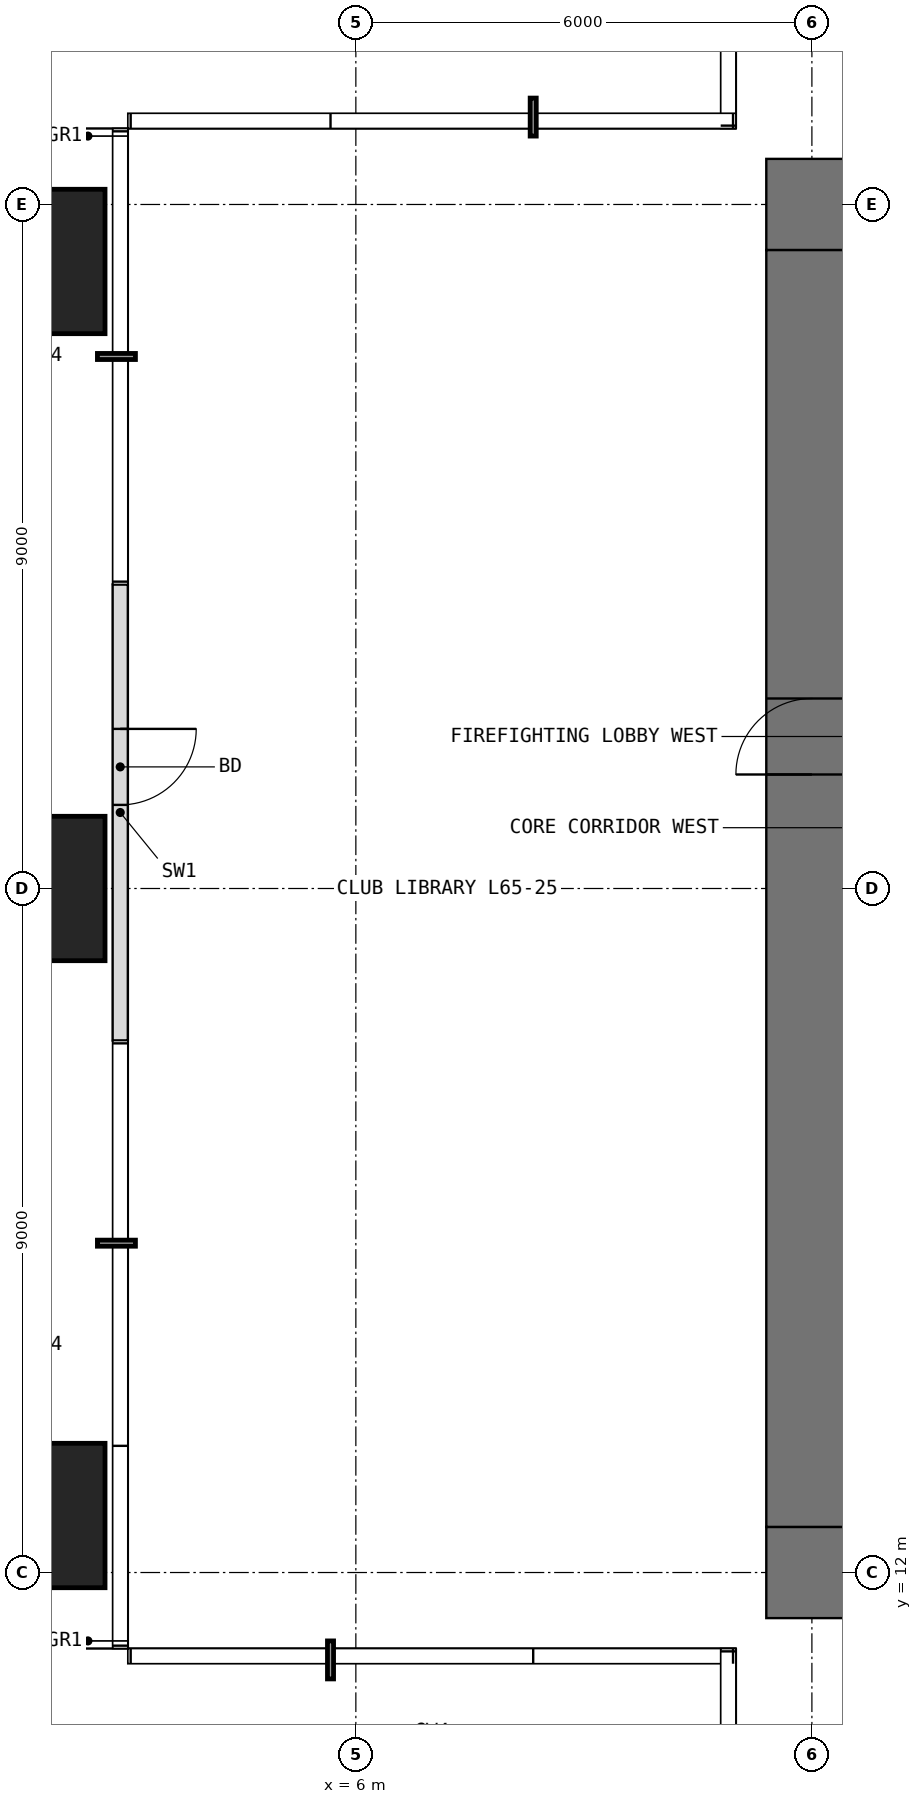
"""IFC4 building model, lengths in metres.
Left out: names, types, materials, properties, quantities, classifications, styles, units other than length and angle.
Written with IfcOpenShell. Run it as: python <this file> out.ifc"""

import sys

from ifc_helpers import new_model, si_unit, direction, frame, frame_2d, origin, origin_2d, place, context, subcontext, project, spatial, rectangle, extrude, element, fill, save


model = new_model("IFC4")
c1 = context("Model", 3, precision=1e-05, world=origin(), true_north=direction((0.0, 1.0)))
c2 = subcontext(c1, "Body", "Model", "MODEL_VIEW")
j1 = project(units=[si_unit("LENGTHUNIT", "METRE"), si_unit("PLANEANGLEUNIT", "RADIAN")], contexts=[c1])
p1 = place(None, origin())
s1 = spatial("IfcSite", under=j1, at=p1, CompositionType="ELEMENT")
p2 = place(p1, origin())
s2 = spatial("IfcBuilding", under=s1, at=p2, CompositionType="ELEMENT")
p3 = place(p2, frame((0.0, 0.0, 273.4)))
s3 = spatial("IfcBuildingStorey", under=s2, at=p3, CompositionType="ELEMENT", Elevation=273.4)
for number, where, z_axis, x_axis in (
    (1, (1.75, 12.75, 0.0), (0.0, 0.0, 1.0), (1.0, 0.0, 0.0)),
    (2, (1.75, 21.0, 0.0), (0.0, 0.0, 1.0), (1.0, 0.0, 0.0)),
    (3, (1.75, 29.25, 0.0), (0.0, 0.0, 1.0), (1.0, 0.0, 0.0)),
):
    element("IfcColumn", number, at=place(p3, frame(where, z_axis=z_axis, x_axis=x_axis)), inside=s3, PredefinedType="COLUMN", context=c2, shape_type="SweptSolid", body=[
        extrude(rectangle(XDim=1.9, YDim=1.9, at=origin_2d()), origin(), (0.0, 0.0, 1.0), 4.5),
    ])
p4 = place(p3, frame((2.9, 25.0, 0.0), z_axis=(0.0, 0.0, 1.0), x_axis=(0.0, -1.0, 0.0)))
e4 = element("IfcWall", 4, at=p4, inside=s3, PredefinedType="USERDEFINED", context=c2, shape_type="SweptSolid", body=[
    extrude(rectangle(XDim=6.0, YDim=0.2, at=frame_2d((3.0, 0.0))), origin(), (0.0, 0.0, 1.0), 4.2),
])
p5 = place(p4, frame((1.9, 0.0, 0.0)))
e5 = element("IfcOpeningElement", 5, at=p5, cuts=e4, PredefinedType="OPENING", context=c2, shape_type="SweptSolid", body=[
    extrude(rectangle(XDim=1.0, YDim=2.4, at=frame_2d((0.5, 1.2))), frame((0.0, 0.11, 0.0), z_axis=(0.0, -1.0, 0.0), x_axis=(1.0, 0.0, 0.0)), (0.0, 0.0, 1.0), 0.22),
])
p6 = place(p3, frame((11.4, 12.0, -0.05), z_axis=(0.0, 0.0, 1.0), x_axis=(1.0, 0.0, 0.0)))
e6 = element("IfcWall", 6, at=p6, inside=s3, PredefinedType="SHEAR", context=c2, shape_type="SweptSolid", body=[
    extrude(rectangle(XDim=19.2, YDim=1.2, at=frame_2d((9.6, 0.0))), origin(), (0.0, 0.0, 1.0), 4.45),
])
p7 = place(p6, frame((8.6, 0.0, 0.05)))
e7 = element("IfcOpeningElement", 7, at=p7, cuts=e6, PredefinedType="OPENING", context=c2, shape_type="SweptSolid", body=[
    extrude(rectangle(XDim=2.0, YDim=2.2, at=frame_2d((1.0, 1.1))), frame((0.0, 0.61, 0.0), z_axis=(0.0, -1.0, 0.0), x_axis=(1.0, 0.0, 0.0)), (0.0, 0.0, 1.0), 1.22),
])
p8 = place(p3, frame((11.4, 30.0, -0.05), z_axis=(0.0, 0.0, 1.0), x_axis=(1.0, 0.0, 0.0)))
e8 = element("IfcWall", 8, at=p8, inside=s3, PredefinedType="SHEAR", context=c2, shape_type="SweptSolid", body=[
    extrude(rectangle(XDim=19.2, YDim=1.2, at=frame_2d((9.6, 0.0))), origin(), (0.0, 0.0, 1.0), 4.45),
])
p9 = place(p8, frame((8.6, 0.0, 0.05)))
e9 = element("IfcOpeningElement", 9, at=p9, cuts=e8, PredefinedType="OPENING", context=c2, shape_type="SweptSolid", body=[
    extrude(rectangle(XDim=2.0, YDim=2.2, at=frame_2d((1.0, 1.1))), frame((0.0, 0.61, 0.0), z_axis=(0.0, -1.0, 0.0), x_axis=(1.0, 0.0, 0.0)), (0.0, 0.0, 1.0), 1.22),
])
p10 = place(p3, frame((12.0, 12.6, -0.05), z_axis=(0.0, 0.0, 1.0), x_axis=(0.0, 1.0, 0.0)))
e10 = element("IfcWall", 10, at=p10, inside=s3, PredefinedType="SHEAR", context=c2, shape_type="SweptSolid", body=[
    extrude(rectangle(XDim=16.8, YDim=1.2, at=frame_2d((8.4, 0.0))), origin(), (0.0, 0.0, 1.0), 4.45),
])
p11 = place(p10, frame((9.9, 0.0, 0.05)))
e11 = element("IfcOpeningElement", 11, at=p11, cuts=e10, PredefinedType="OPENING", context=c2, shape_type="SweptSolid", body=[
    extrude(rectangle(XDim=1.0, YDim=2.2, at=frame_2d((0.5, 1.1))), frame((0.0, 0.61, 0.0), z_axis=(0.0, -1.0, 0.0), x_axis=(1.0, 0.0, 0.0)), (0.0, 0.0, 1.0), 1.22),
])
p12 = place(p5, origin())
e12 = element("IfcDoor", 12, at=p12, inside=s3, OperationType="SINGLE_SWING_LEFT", PredefinedType="DOOR", context=c2, shape_type="SweptSolid", body=[
    extrude(rectangle(XDim=1.0, YDim=2.4, at=frame_2d((0.5, 1.2))), frame((0.0, 0.025, 0.0), z_axis=(0.0, -1.0, 0.0), x_axis=(1.0, 0.0, 0.0)), (0.0, 0.0, 1.0), 0.05),
])
fill(e5, e12)
p13 = place(p11, origin())
e13 = element("IfcDoor", 13, at=p13, inside=s3, OperationType="SINGLE_SWING_LEFT", PredefinedType="DOOR", context=c2, shape_type="SweptSolid", body=[
    extrude(rectangle(XDim=1.0, YDim=2.2, at=frame_2d((0.5, 1.1))), frame((0.0, 0.025, 0.0), z_axis=(0.0, -1.0, 0.0), x_axis=(1.0, 0.0, 0.0)), (0.0, 0.0, 1.0), 0.05),
])
fill(e11, e13)
save(model, sys.argv[1])
